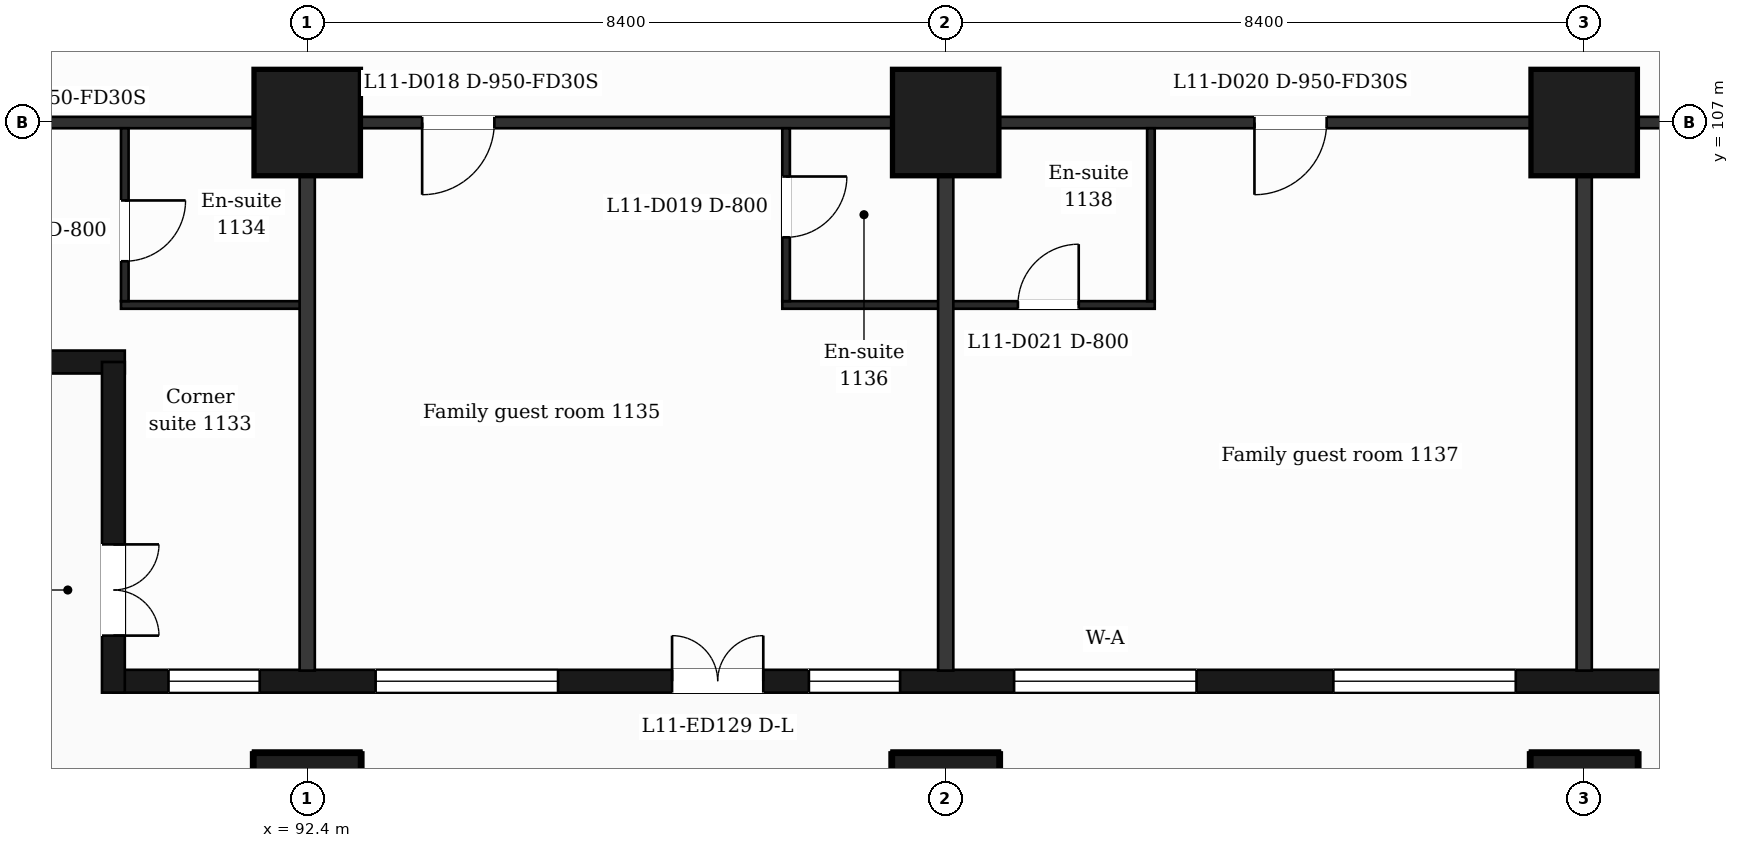
"""IFC4 building model, lengths in metres.
Left out: names, types, materials, properties, quantities, classifications, styles, units other than length and angle.
Written with IfcOpenShell. Run it as: python <this file> out.ifc"""

import sys

from ifc_helpers import new_model, si_unit, direction, frame, frame_2d, origin, origin_2d, place, context, subcontext, project, spatial, rectangle, extrude, element, fill, save


model = new_model("IFC4")
c1 = context("Model", 3, precision=1e-05, world=origin(), true_north=direction((0.0, 1.0)))
c2 = subcontext(c1, "Body", "Model", "MODEL_VIEW")
j1 = project(units=[si_unit("LENGTHUNIT", "METRE"), si_unit("PLANEANGLEUNIT", "RADIAN")], contexts=[c1])
p1 = place(None, origin())
s1 = spatial("IfcSite", under=j1, at=p1, CompositionType="ELEMENT")
p2 = place(p1, origin())
s2 = spatial("IfcBuilding", under=s1, at=p2, CompositionType="ELEMENT")
p3 = place(p2, frame((0.0, 0.0, 56.5)))
s3 = spatial("IfcBuildingStorey", under=s2, at=p3, CompositionType="ELEMENT", Elevation=56.5)
for number, where, z_axis, x_axis in (
    (1, (92.4, 98.0, 0.0), (0.0, 0.0, 1.0), (1.0, 0.0, 0.0)),
    (2, (100.8, 98.0, 0.0), (0.0, 0.0, 1.0), (1.0, 0.0, 0.0)),
    (3, (109.2, 98.0, 0.0), (0.0, 0.0, 1.0), (1.0, 0.0, 0.0)),
    (4, (92.4, 107.0, 0.0), (0.0, 0.0, 1.0), (1.0, 0.0, 0.0)),
    (5, (100.8, 107.0, 0.0), (0.0, 0.0, 1.0), (1.0, 0.0, 0.0)),
    (6, (109.2, 107.0, 0.0), (0.0, 0.0, 1.0), (1.0, 0.0, 0.0)),
):
    element("IfcColumn", number, at=place(p3, frame(where, z_axis=z_axis, x_axis=x_axis)), inside=s3, PredefinedType="COLUMN", context=c2, shape_type="SweptSolid", body=[
        extrude(rectangle(XDim=1.4, YDim=1.4, at=origin_2d()), origin(), (0.0, 0.0, 1.0), 3.5),
    ])
p4 = place(p3, frame((89.85, 99.65, 0.0), z_axis=(0.0, 0.0, 1.0), x_axis=(1.0, 0.0, 0.0)))
e7 = element("IfcWall", 7, at=p4, inside=s3, PredefinedType="SOLIDWALL", context=c2, shape_type="SweptSolid", body=[
    extrude(rectangle(XDim=47.25, YDim=0.3, at=frame_2d((23.625, 0.0))), origin(), (0.0, 0.0, 1.0), 3.18),
])
p5 = place(p4, frame((0.725, 0.0, 0.9)))
e8 = element("IfcOpeningElement", 8, at=p5, cuts=e7, PredefinedType="OPENING", context=c2, shape_type="SweptSolid", body=[
    extrude(rectangle(XDim=1.2, YDim=2.1, at=frame_2d((0.6, 1.05))), frame((0.0, 0.16, 0.0), z_axis=(0.0, -1.0, 0.0), x_axis=(1.0, 0.0, 0.0)), (0.0, 0.0, 1.0), 0.32),
])
p6 = place(p4, frame((3.45, 0.0, 0.9)))
e9 = element("IfcOpeningElement", 9, at=p6, cuts=e7, PredefinedType="OPENING", context=c2, shape_type="SweptSolid", body=[
    extrude(rectangle(XDim=2.4, YDim=2.1, at=frame_2d((1.2, 1.05))), frame((0.0, 0.16, 0.0), z_axis=(0.0, -1.0, 0.0), x_axis=(1.0, 0.0, 0.0)), (0.0, 0.0, 1.0), 0.32),
])
p7 = place(p4, frame((7.35, 0.0, 0.0)))
e10 = element("IfcOpeningElement", 10, at=p7, cuts=e7, PredefinedType="OPENING", context=c2, shape_type="SweptSolid", body=[
    extrude(rectangle(XDim=1.2, YDim=2.4, at=frame_2d((0.6, 1.2))), frame((0.0, 0.16, 0.0), z_axis=(0.0, -1.0, 0.0), x_axis=(1.0, 0.0, 0.0)), (0.0, 0.0, 1.0), 0.32),
])
p8 = place(p4, frame((9.15, 0.0, 0.9)))
e11 = element("IfcOpeningElement", 11, at=p8, cuts=e7, PredefinedType="OPENING", context=c2, shape_type="SweptSolid", body=[
    extrude(rectangle(XDim=1.2, YDim=2.1, at=frame_2d((0.6, 1.05))), frame((0.0, 0.16, 0.0), z_axis=(0.0, -1.0, 0.0), x_axis=(1.0, 0.0, 0.0)), (0.0, 0.0, 1.0), 0.32),
])
p9 = place(p4, frame((11.85, 0.0, 0.9)))
e12 = element("IfcOpeningElement", 12, at=p9, cuts=e7, PredefinedType="OPENING", context=c2, shape_type="SweptSolid", body=[
    extrude(rectangle(XDim=2.4, YDim=2.1, at=frame_2d((1.2, 1.05))), frame((0.0, 0.16, 0.0), z_axis=(0.0, -1.0, 0.0), x_axis=(1.0, 0.0, 0.0)), (0.0, 0.0, 1.0), 0.32),
])
p10 = place(p4, frame((16.05, 0.0, 0.9)))
e13 = element("IfcOpeningElement", 13, at=p10, cuts=e7, PredefinedType="OPENING", context=c2, shape_type="SweptSolid", body=[
    extrude(rectangle(XDim=2.4, YDim=2.1, at=frame_2d((1.2, 1.05))), frame((0.0, 0.16, 0.0), z_axis=(0.0, -1.0, 0.0), x_axis=(1.0, 0.0, 0.0)), (0.0, 0.0, 1.0), 0.32),
])
p11 = place(p4, frame((20.85, 0.0, 0.9)))
e14 = element("IfcOpeningElement", 14, at=p11, cuts=e7, PredefinedType="OPENING", context=c2, shape_type="SweptSolid", body=[
    extrude(rectangle(XDim=1.2, YDim=2.1, at=frame_2d((0.6, 1.05))), frame((0.0, 0.16, 0.0), z_axis=(0.0, -1.0, 0.0), x_axis=(1.0, 0.0, 0.0)), (0.0, 0.0, 1.0), 0.32),
])
p12 = place(p4, frame((25.05, 0.0, 0.9)))
e15 = element("IfcOpeningElement", 15, at=p12, cuts=e7, PredefinedType="OPENING", context=c2, shape_type="SweptSolid", body=[
    extrude(rectangle(XDim=1.2, YDim=2.1, at=frame_2d((0.6, 1.05))), frame((0.0, 0.16, 0.0), z_axis=(0.0, -1.0, 0.0), x_axis=(1.0, 0.0, 0.0)), (0.0, 0.0, 1.0), 0.32),
])
p13 = place(p4, frame((28.65, 0.0, 0.9)))
e16 = element("IfcOpeningElement", 16, at=p13, cuts=e7, PredefinedType="OPENING", context=c2, shape_type="SweptSolid", body=[
    extrude(rectangle(XDim=2.4, YDim=2.1, at=frame_2d((1.2, 1.05))), frame((0.0, 0.16, 0.0), z_axis=(0.0, -1.0, 0.0), x_axis=(1.0, 0.0, 0.0)), (0.0, 0.0, 1.0), 0.32),
])
p14 = place(p4, frame((32.85, 0.0, 0.9)))
e17 = element("IfcOpeningElement", 17, at=p14, cuts=e7, PredefinedType="OPENING", context=c2, shape_type="SweptSolid", body=[
    extrude(rectangle(XDim=2.4, YDim=2.1, at=frame_2d((1.2, 1.05))), frame((0.0, 0.16, 0.0), z_axis=(0.0, -1.0, 0.0), x_axis=(1.0, 0.0, 0.0)), (0.0, 0.0, 1.0), 0.32),
])
p15 = place(p4, frame((37.05, 0.0, 0.9)))
e18 = element("IfcOpeningElement", 18, at=p15, cuts=e7, PredefinedType="OPENING", context=c2, shape_type="SweptSolid", body=[
    extrude(rectangle(XDim=2.4, YDim=2.1, at=frame_2d((1.2, 1.05))), frame((0.0, 0.16, 0.0), z_axis=(0.0, -1.0, 0.0), x_axis=(1.0, 0.0, 0.0)), (0.0, 0.0, 1.0), 0.32),
])
p16 = place(p4, frame((41.25, 0.0, 0.9)))
e19 = element("IfcOpeningElement", 19, at=p16, cuts=e7, PredefinedType="OPENING", context=c2, shape_type="SweptSolid", body=[
    extrude(rectangle(XDim=2.4, YDim=2.1, at=frame_2d((1.2, 1.05))), frame((0.0, 0.16, 0.0), z_axis=(0.0, -1.0, 0.0), x_axis=(1.0, 0.0, 0.0)), (0.0, 0.0, 1.0), 0.32),
])
p17 = place(p4, frame((45.25, 0.0, 0.9)))
e20 = element("IfcOpeningElement", 20, at=p17, cuts=e7, PredefinedType="OPENING", context=c2, shape_type="SweptSolid", body=[
    extrude(rectangle(XDim=1.2, YDim=2.1, at=frame_2d((0.6, 1.05))), frame((0.0, 0.16, 0.0), z_axis=(0.0, -1.0, 0.0), x_axis=(1.0, 0.0, 0.0)), (0.0, 0.0, 1.0), 0.32),
])
p18 = place(p3, frame((86.452, 103.85, 0.0), z_axis=(0.0, 0.0, 1.0), x_axis=(1.0, 0.0, 0.0)))
e21 = element("IfcWall", 21, at=p18, inside=s3, PredefinedType="SOLIDWALL", context=c2, shape_type="SweptSolid", body=[
    extrude(rectangle(XDim=3.548, YDim=0.3, at=frame_2d((1.774, 0.0))), origin(), (0.0, 0.0, 1.0), 3.18),
])
p19 = place(p3, frame((89.85, 103.85, 0.0), z_axis=(0.0, 0.0, 1.0), x_axis=(0.0, -1.0, 0.0)))
e22 = element("IfcWall", 22, at=p19, inside=s3, PredefinedType="SOLIDWALL", context=c2, shape_type="SweptSolid", body=[
    extrude(rectangle(XDim=4.35, YDim=0.3, at=frame_2d((2.175, 0.0))), origin(), (0.0, 0.0, 1.0), 3.18),
])
p20 = place(p19, frame((2.4, 0.0, 0.0)))
e23 = element("IfcOpeningElement", 23, at=p20, cuts=e22, PredefinedType="OPENING", context=c2, shape_type="SweptSolid", body=[
    extrude(rectangle(XDim=1.2, YDim=2.4, at=frame_2d((0.6, 1.2))), frame((0.0, 0.16, 0.0), z_axis=(0.0, -1.0, 0.0), x_axis=(1.0, 0.0, 0.0)), (0.0, 0.0, 1.0), 0.32),
])
p21 = place(p3, frame((89.95, 104.6, 0.0), z_axis=(0.0, 0.0, 1.0), x_axis=(1.0, 0.0, 0.0)))
e24 = element("IfcWall", 24, at=p21, inside=s3, PredefinedType="PARTITIONING", context=c2, shape_type="SweptSolid", body=[
    extrude(rectangle(XDim=2.45, YDim=0.1, at=frame_2d((1.225, 0.0))), origin(), (0.0, 0.0, 1.0), 3.18),
])
p22 = place(p3, frame((98.65, 104.6, 0.0), z_axis=(0.0, 0.0, 1.0), x_axis=(1.0, 0.0, 0.0)))
e25 = element("IfcWall", 25, at=p22, inside=s3, PredefinedType="PARTITIONING", context=c2, shape_type="SweptSolid", body=[
    extrude(rectangle(XDim=4.9, YDim=0.1, at=frame_2d((2.45, 0.0))), origin(), (0.0, 0.0, 1.0), 3.18),
])
p23 = place(p22, frame((3.1, 0.0, 0.0)))
e26 = element("IfcOpeningElement", 26, at=p23, cuts=e25, PredefinedType="OPENING", context=c2, shape_type="SweptSolid", body=[
    extrude(rectangle(XDim=0.8, YDim=2.1, at=frame_2d((0.4, 1.05))), frame((0.0, 0.06, 0.0), z_axis=(0.0, -1.0, 0.0), x_axis=(1.0, 0.0, 0.0)), (0.0, 0.0, 1.0), 0.12),
])
p24 = place(p3, frame((87.018, 107.0, 0.0), z_axis=(0.0, 0.0, 1.0), x_axis=(1.0, 0.0, 0.0)))
e27 = element("IfcWall", 27, at=p24, inside=s3, PredefinedType="PARTITIONING", context=c2, shape_type="SweptSolid", body=[
    extrude(rectangle(XDim=52.765, YDim=0.15, at=frame_2d((26.382, 0.0))), origin(), (0.0, 0.0, 1.0), 3.18),
])
p25 = place(p24, frame((1.032, 0.0, 0.0)))
e28 = element("IfcOpeningElement", 28, at=p25, cuts=e27, PredefinedType="OPENING", context=c2, shape_type="SweptSolid", body=[
    extrude(rectangle(XDim=0.95, YDim=2.1, at=frame_2d((0.475, 1.05))), frame((0.0, 0.085, 0.0), z_axis=(0.0, -1.0, 0.0), x_axis=(1.0, 0.0, 0.0)), (0.0, 0.0, 1.0), 0.17),
])
p26 = place(p24, frame((6.894, 0.0, 0.0)))
e29 = element("IfcOpeningElement", 29, at=p26, cuts=e27, PredefinedType="OPENING", context=c2, shape_type="SweptSolid", body=[
    extrude(rectangle(XDim=0.95, YDim=2.1, at=frame_2d((0.475, 1.05))), frame((0.0, 0.085, 0.0), z_axis=(0.0, -1.0, 0.0), x_axis=(1.0, 0.0, 0.0)), (0.0, 0.0, 1.0), 0.17),
])
p27 = place(p24, frame((17.844, 0.0, 0.0)))
e30 = element("IfcOpeningElement", 30, at=p27, cuts=e27, PredefinedType="OPENING", context=c2, shape_type="SweptSolid", body=[
    extrude(rectangle(XDim=0.95, YDim=2.1, at=frame_2d((0.475, 1.05))), frame((0.0, 0.085, 0.0), z_axis=(0.0, -1.0, 0.0), x_axis=(1.0, 0.0, 0.0)), (0.0, 0.0, 1.0), 0.17),
])
p28 = place(p24, frame((26.245, 0.0, 0.0)))
e31 = element("IfcOpeningElement", 31, at=p28, cuts=e27, PredefinedType="OPENING", context=c2, shape_type="SweptSolid", body=[
    extrude(rectangle(XDim=0.95, YDim=2.1, at=frame_2d((0.475, 1.05))), frame((0.0, 0.085, 0.0), z_axis=(0.0, -1.0, 0.0), x_axis=(1.0, 0.0, 0.0)), (0.0, 0.0, 1.0), 0.17),
])
p29 = place(p24, frame((35.822, 0.0, 0.0)))
e32 = element("IfcOpeningElement", 32, at=p29, cuts=e27, PredefinedType="OPENING", context=c2, shape_type="SweptSolid", body=[
    extrude(rectangle(XDim=0.95, YDim=2.1, at=frame_2d((0.475, 1.05))), frame((0.0, 0.085, 0.0), z_axis=(0.0, -1.0, 0.0), x_axis=(1.0, 0.0, 0.0)), (0.0, 0.0, 1.0), 0.17),
])
p30 = place(p24, frame((42.302, 0.0, 0.0)))
e33 = element("IfcOpeningElement", 33, at=p30, cuts=e27, PredefinedType="OPENING", context=c2, shape_type="SweptSolid", body=[
    extrude(rectangle(XDim=0.95, YDim=2.1, at=frame_2d((0.475, 1.05))), frame((0.0, 0.085, 0.0), z_axis=(0.0, -1.0, 0.0), x_axis=(1.0, 0.0, 0.0)), (0.0, 0.0, 1.0), 0.17),
])
p31 = place(p24, frame((49.285, 0.0, 0.0)))
e34 = element("IfcOpeningElement", 34, at=p31, cuts=e27, PredefinedType="OPENING", context=c2, shape_type="SweptSolid", body=[
    extrude(rectangle(XDim=0.95, YDim=2.1, at=frame_2d((0.475, 1.05))), frame((0.0, 0.085, 0.0), z_axis=(0.0, -1.0, 0.0), x_axis=(1.0, 0.0, 0.0)), (0.0, 0.0, 1.0), 0.17),
])
p32 = place(p3, frame((90.0, 104.65, 0.0), z_axis=(0.0, 0.0, 1.0), x_axis=(0.0, 1.0, 0.0)))
e35 = element("IfcWall", 35, at=p32, inside=s3, PredefinedType="PARTITIONING", context=c2, shape_type="SweptSolid", body=[
    extrude(rectangle(XDim=2.275, YDim=0.1, at=frame_2d((1.138, 0.0))), origin(), (0.0, 0.0, 1.0), 3.18),
])
p33 = place(p32, frame((0.525, 0.0, 0.0)))
e36 = element("IfcOpeningElement", 36, at=p33, cuts=e35, PredefinedType="OPENING", context=c2, shape_type="SweptSolid", body=[
    extrude(rectangle(XDim=0.8, YDim=2.1, at=frame_2d((0.4, 1.05))), frame((0.0, 0.06, 0.0), z_axis=(0.0, -1.0, 0.0), x_axis=(1.0, 0.0, 0.0)), (0.0, 0.0, 1.0), 0.12),
])
p34 = place(p3, frame((92.4, 99.79, 0.0), z_axis=(0.0, 0.0, 1.0), x_axis=(0.0, 1.0, 0.0)))
e37 = element("IfcWall", 37, at=p34, inside=s3, PredefinedType="PARTITIONING", context=c2, shape_type="SweptSolid", body=[
    extrude(rectangle(XDim=7.135, YDim=0.2, at=frame_2d((3.567, 0.0))), origin(), (0.0, 0.0, 1.0), 3.18),
])
p35 = place(p3, frame((98.7, 104.65, 0.0), z_axis=(0.0, 0.0, 1.0), x_axis=(0.0, 1.0, 0.0)))
e38 = element("IfcWall", 38, at=p35, inside=s3, PredefinedType="PARTITIONING", context=c2, shape_type="SweptSolid", body=[
    extrude(rectangle(XDim=2.275, YDim=0.1, at=frame_2d((1.138, 0.0))), origin(), (0.0, 0.0, 1.0), 3.18),
])
p36 = place(p35, frame((0.84, 0.0, 0.0)))
e39 = element("IfcOpeningElement", 39, at=p36, cuts=e38, PredefinedType="OPENING", context=c2, shape_type="SweptSolid", body=[
    extrude(rectangle(XDim=0.8, YDim=2.1, at=frame_2d((0.4, 1.05))), frame((0.0, 0.06, 0.0), z_axis=(0.0, -1.0, 0.0), x_axis=(1.0, 0.0, 0.0)), (0.0, 0.0, 1.0), 0.12),
])
p37 = place(p3, frame((100.8, 99.79, 0.0), z_axis=(0.0, 0.0, 1.0), x_axis=(0.0, 1.0, 0.0)))
e40 = element("IfcWall", 40, at=p37, inside=s3, PredefinedType="PARTITIONING", context=c2, shape_type="SweptSolid", body=[
    extrude(rectangle(XDim=7.135, YDim=0.2, at=frame_2d((3.567, 0.0))), origin(), (0.0, 0.0, 1.0), 3.18),
])
p38 = place(p3, frame((103.5, 104.65, 0.0), z_axis=(0.0, 0.0, 1.0), x_axis=(0.0, 1.0, 0.0)))
e41 = element("IfcWall", 41, at=p38, inside=s3, PredefinedType="PARTITIONING", context=c2, shape_type="SweptSolid", body=[
    extrude(rectangle(XDim=2.275, YDim=0.1, at=frame_2d((1.138, 0.0))), origin(), (0.0, 0.0, 1.0), 3.18),
])
p39 = place(p3, frame((109.2, 99.79, 0.0), z_axis=(0.0, 0.0, 1.0), x_axis=(0.0, 1.0, 0.0)))
e42 = element("IfcWall", 42, at=p39, inside=s3, PredefinedType="PARTITIONING", context=c2, shape_type="SweptSolid", body=[
    extrude(rectangle(XDim=7.135, YDim=0.2, at=frame_2d((3.567, 0.0))), origin(), (0.0, 0.0, 1.0), 3.18),
])
p40 = place(p5, origin())
e43 = element("IfcWindow", 43, at=p40, inside=s3, PartitioningType="SINGLE_PANEL", PredefinedType="WINDOW", context=c2, shape_type="SweptSolid", body=[
    extrude(rectangle(XDim=1.2, YDim=2.1, at=frame_2d((0.6, 1.05))), frame((0.0, 0.03, 0.0), z_axis=(0.0, -1.0, 0.0), x_axis=(1.0, 0.0, 0.0)), (0.0, 0.0, 1.0), 0.06),
])
fill(e8, e43)
p41 = place(p6, origin())
e44 = element("IfcWindow", 44, at=p41, inside=s3, PartitioningType="SINGLE_PANEL", PredefinedType="WINDOW", context=c2, shape_type="SweptSolid", body=[
    extrude(rectangle(XDim=2.4, YDim=2.1, at=frame_2d((1.2, 1.05))), frame((0.0, 0.03, 0.0), z_axis=(0.0, -1.0, 0.0), x_axis=(1.0, 0.0, 0.0)), (0.0, 0.0, 1.0), 0.06),
])
fill(e9, e44)
p42 = place(p7, origin())
e45 = element("IfcDoor", 45, at=p42, inside=s3, OperationType="DOUBLE_DOOR_SINGLE_SWING", PredefinedType="DOOR", context=c2, shape_type="SweptSolid", body=[
    extrude(rectangle(XDim=1.2, YDim=2.4, at=frame_2d((0.6, 1.2))), frame((0.0, 0.025, 0.0), z_axis=(0.0, -1.0, 0.0), x_axis=(1.0, 0.0, 0.0)), (0.0, 0.0, 1.0), 0.05),
])
fill(e10, e45)
p43 = place(p8, origin())
e46 = element("IfcWindow", 46, at=p43, inside=s3, PartitioningType="SINGLE_PANEL", PredefinedType="WINDOW", context=c2, shape_type="SweptSolid", body=[
    extrude(rectangle(XDim=1.2, YDim=2.1, at=frame_2d((0.6, 1.05))), frame((0.0, 0.03, 0.0), z_axis=(0.0, -1.0, 0.0), x_axis=(1.0, 0.0, 0.0)), (0.0, 0.0, 1.0), 0.06),
])
fill(e11, e46)
p44 = place(p9, origin())
e47 = element("IfcWindow", 47, at=p44, inside=s3, PartitioningType="SINGLE_PANEL", PredefinedType="WINDOW", context=c2, shape_type="SweptSolid", body=[
    extrude(rectangle(XDim=2.4, YDim=2.1, at=frame_2d((1.2, 1.05))), frame((0.0, 0.03, 0.0), z_axis=(0.0, -1.0, 0.0), x_axis=(1.0, 0.0, 0.0)), (0.0, 0.0, 1.0), 0.06),
])
fill(e12, e47)
p45 = place(p10, origin())
e48 = element("IfcWindow", 48, at=p45, inside=s3, PartitioningType="SINGLE_PANEL", PredefinedType="WINDOW", context=c2, shape_type="SweptSolid", body=[
    extrude(rectangle(XDim=2.4, YDim=2.1, at=frame_2d((1.2, 1.05))), frame((0.0, 0.03, 0.0), z_axis=(0.0, -1.0, 0.0), x_axis=(1.0, 0.0, 0.0)), (0.0, 0.0, 1.0), 0.06),
])
fill(e13, e48)
p46 = place(p20, origin())
e49 = element("IfcDoor", 49, at=p46, inside=s3, OperationType="DOUBLE_DOOR_SINGLE_SWING", PredefinedType="DOOR", context=c2, shape_type="SweptSolid", body=[
    extrude(rectangle(XDim=1.2, YDim=2.4, at=frame_2d((0.6, 1.2))), frame((0.0, 0.025, 0.0), z_axis=(0.0, -1.0, 0.0), x_axis=(1.0, 0.0, 0.0)), (0.0, 0.0, 1.0), 0.05),
])
fill(e23, e49)
p47 = place(p33, origin())
e50 = element("IfcDoor", 50, at=p47, inside=s3, OperationType="SINGLE_SWING_RIGHT", PredefinedType="DOOR", context=c2, shape_type="SweptSolid", body=[
    extrude(rectangle(XDim=0.8, YDim=2.1, at=frame_2d((0.4, 1.05))), frame((0.0, 0.025, 0.0), z_axis=(0.0, -1.0, 0.0), x_axis=(1.0, 0.0, 0.0)), (0.0, 0.0, 1.0), 0.05),
])
fill(e36, e50)
p48 = place(p26, origin())
e51 = element("IfcDoor", 51, at=p48, inside=s3, OperationType="SINGLE_SWING_LEFT", PredefinedType="DOOR", context=c2, shape_type="SweptSolid", body=[
    extrude(rectangle(XDim=0.95, YDim=2.1, at=frame_2d((0.475, 1.05))), frame((0.0, 0.025, 0.0), z_axis=(0.0, -1.0, 0.0), x_axis=(1.0, 0.0, 0.0)), (0.0, 0.0, 1.0), 0.05),
])
fill(e29, e51)
p49 = place(p36, origin())
e52 = element("IfcDoor", 52, at=p49, inside=s3, OperationType="SINGLE_SWING_RIGHT", PredefinedType="DOOR", context=c2, shape_type="SweptSolid", body=[
    extrude(rectangle(XDim=0.8, YDim=2.1, at=frame_2d((0.4, 1.05))), frame((0.0, 0.025, 0.0), z_axis=(0.0, -1.0, 0.0), x_axis=(1.0, 0.0, 0.0)), (0.0, 0.0, 1.0), 0.05),
])
fill(e39, e52)
p50 = place(p27, origin())
e53 = element("IfcDoor", 53, at=p50, inside=s3, OperationType="SINGLE_SWING_LEFT", PredefinedType="DOOR", context=c2, shape_type="SweptSolid", body=[
    extrude(rectangle(XDim=0.95, YDim=2.1, at=frame_2d((0.475, 1.05))), frame((0.0, 0.025, 0.0), z_axis=(0.0, -1.0, 0.0), x_axis=(1.0, 0.0, 0.0)), (0.0, 0.0, 1.0), 0.05),
])
fill(e30, e53)
p51 = place(p23, origin())
e54 = element("IfcDoor", 54, at=p51, inside=s3, OperationType="SINGLE_SWING_RIGHT", PredefinedType="DOOR", context=c2, shape_type="SweptSolid", body=[
    extrude(rectangle(XDim=0.8, YDim=2.1, at=frame_2d((0.4, 1.05))), frame((0.0, 0.025, 0.0), z_axis=(0.0, -1.0, 0.0), x_axis=(1.0, 0.0, 0.0)), (0.0, 0.0, 1.0), 0.05),
])
fill(e26, e54)
save(model, sys.argv[1])
